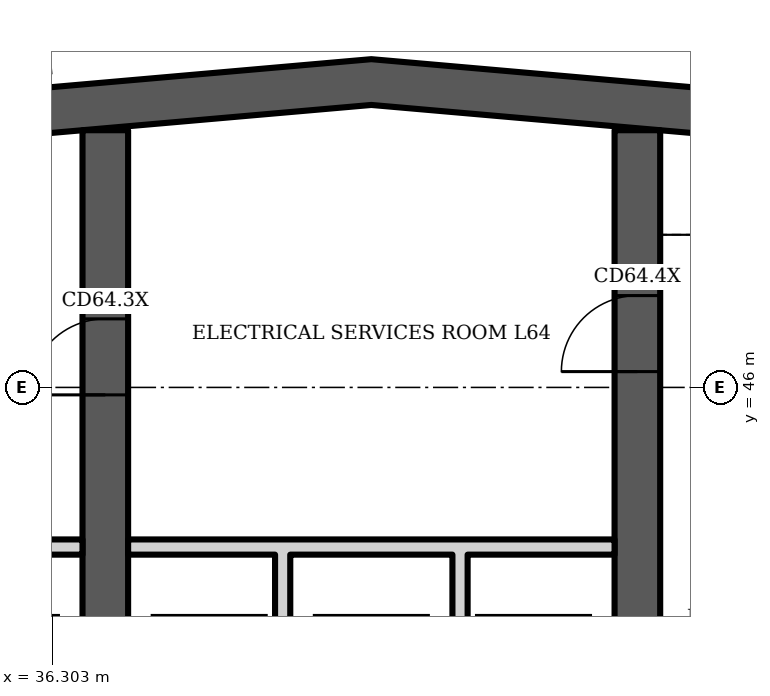
"""IFC4 building model, lengths in metres.
Left out: names, types, materials, properties, quantities, classifications, styles, units other than length and angle.
Written with IfcOpenShell. Run it as: python <this file> out.ifc"""

import sys

from ifc_helpers import new_model, si_unit, direction, frame, frame_2d, origin, place, context, subcontext, project, spatial, polyline, rectangle, outline, extrude, element, fill, save


model = new_model("IFC4")
c1 = context("Model", 3, precision=1e-05, world=origin(), true_north=direction((0.0, 1.0)))
c2 = subcontext(c1, "Body", "Model", "MODEL_VIEW")
j1 = project(units=[si_unit("LENGTHUNIT", "METRE"), si_unit("PLANEANGLEUNIT", "RADIAN")], contexts=[c1])
p1 = place(None, origin())
s1 = spatial("IfcSite", under=j1, at=p1, CompositionType="ELEMENT")
p2 = place(p1, origin())
s2 = spatial("IfcBuilding", under=s1, at=p2, CompositionType="ELEMENT")
p3 = place(p2, frame((0.0, 0.0, 253.9)))
s3 = spatial("IfcBuildingStorey", under=s2, at=p3, CompositionType="ELEMENT", Elevation=253.9)
p4 = place(p3, origin())
e1 = element("IfcWall", 1, at=p4, inside=s3, PredefinedType="SHEAR", context=c2, shape_type="SweptSolid", body=[
    extrude(outline(polyline([(23.0, 48.185), (40.5, 49.716), (58.0, 48.185), (58.0, 48.787), (40.5, 50.318), (23.0, 48.787), (23.0, 48.185)])), origin(), (0.0, 0.0, 1.0), 3.6),
])
p5 = place(p3, frame((37.0, 34.6, 0.0), z_axis=(0.0, 0.0, 1.0), x_axis=(0.0, 1.0, 0.0)))
e2 = element("IfcWall", 2, at=p5, inside=s3, PredefinedType="SHEAR", context=c2, shape_type="SweptSolid", body=[
    extrude(rectangle(XDim=14.784, YDim=0.6, at=frame_2d((7.392, 0.0))), origin(), (0.0, 0.0, 1.0), 3.6),
])
p6 = place(p5, frame((11.302, 0.0, 0.0)))
e3 = element("IfcOpeningElement", 3, at=p6, cuts=e2, PredefinedType="OPENING", context=c2, shape_type="SweptSolid", body=[
    extrude(rectangle(XDim=1.0, YDim=2.1, at=frame_2d((0.5, 1.05))), frame((0.0, 0.31, 0.0), z_axis=(0.0, -1.0, 0.0), x_axis=(1.0, 0.0, 0.0)), (0.0, 0.0, 1.0), 0.62),
])
p7 = place(p5, frame((3.8, 0.0, 0.0)))
e4 = element("IfcOpeningElement", 4, at=p7, cuts=e2, PredefinedType="OPENING", context=c2, shape_type="SweptSolid", body=[
    extrude(rectangle(XDim=1.1, YDim=2.1, at=frame_2d((0.55, 1.05))), frame((0.0, 0.31, 0.0), z_axis=(0.0, -1.0, 0.0), x_axis=(1.0, 0.0, 0.0)), (0.0, 0.0, 1.0), 0.62),
])
p8 = place(p3, frame((44.0, 34.6, 0.0), z_axis=(0.0, 0.0, 1.0), x_axis=(0.0, 1.0, 0.0)))
e5 = element("IfcWall", 5, at=p8, inside=s3, PredefinedType="SHEAR", context=c2, shape_type="SweptSolid", body=[
    extrude(rectangle(XDim=14.784, YDim=0.6, at=frame_2d((7.392, 0.0))), origin(), (0.0, 0.0, 1.0), 3.6),
])
p9 = place(p8, frame((11.608, 0.0, 0.0)))
e6 = element("IfcOpeningElement", 6, at=p9, cuts=e5, PredefinedType="OPENING", context=c2, shape_type="SweptSolid", body=[
    extrude(rectangle(XDim=1.0, YDim=2.1, at=frame_2d((0.5, 1.05))), frame((0.0, 0.31, 0.0), z_axis=(0.0, -1.0, 0.0), x_axis=(1.0, 0.0, 0.0)), (0.0, 0.0, 1.0), 0.62),
])
p10 = place(p8, frame((3.8, 0.0, 0.0)))
e7 = element("IfcOpeningElement", 7, at=p10, cuts=e5, PredefinedType="OPENING", context=c2, shape_type="SweptSolid", body=[
    extrude(rectangle(XDim=1.1, YDim=2.1, at=frame_2d((0.55, 1.05))), frame((0.0, 0.31, 0.0), z_axis=(0.0, -1.0, 0.0), x_axis=(1.0, 0.0, 0.0)), (0.0, 0.0, 1.0), 0.62),
])
p11 = place(p3, origin())
e8 = element("IfcWall", 8, at=p11, inside=s3, PredefinedType="PARTITIONING", context=c2, shape_type="SweptSolid", body=[
    extrude(outline(polyline([(32.433, 40.8), (32.233, 40.8), (32.233, 43.8), (30.3, 43.8), (30.3, 44.0), (36.7, 44.0), (36.7, 43.8), (34.767, 43.8), (34.767, 40.8), (34.567, 40.8), (34.567, 43.8), (32.433, 43.8), (32.433, 40.8)])), origin(), (0.0, 0.0, 1.0), 3.2),
])
p12 = place(p3, origin())
e9 = element("IfcWall", 9, at=p12, inside=s3, PredefinedType="PARTITIONING", context=c2, shape_type="SweptSolid", body=[
    extrude(outline(polyline([(39.433, 40.8), (39.233, 40.8), (39.233, 43.8), (37.3, 43.8), (37.3, 44.0), (43.7, 44.0), (43.7, 43.8), (41.767, 43.8), (41.767, 40.8), (41.567, 40.8), (41.567, 43.8), (39.433, 43.8), (39.433, 40.8)])), origin(), (0.0, 0.0, 1.0), 3.2),
])
p13 = place(p6, origin())
e10 = element("IfcDoor", 10, at=p13, inside=s3, OperationType="SINGLE_SWING_LEFT", PredefinedType="DOOR", context=c2, shape_type="SweptSolid", body=[
    extrude(rectangle(XDim=1.0, YDim=2.1, at=frame_2d((0.5, 1.05))), frame((0.0, 0.025, 0.0), z_axis=(0.0, -1.0, 0.0), x_axis=(1.0, 0.0, 0.0)), (0.0, 0.0, 1.0), 0.05),
])
fill(e3, e10)
p14 = place(p9, origin())
e11 = element("IfcDoor", 11, at=p14, inside=s3, OperationType="SINGLE_SWING_LEFT", PredefinedType="DOOR", context=c2, shape_type="SweptSolid", body=[
    extrude(rectangle(XDim=1.0, YDim=2.1, at=frame_2d((0.5, 1.05))), frame((0.0, 0.025, 0.0), z_axis=(0.0, -1.0, 0.0), x_axis=(1.0, 0.0, 0.0)), (0.0, 0.0, 1.0), 0.05),
])
fill(e6, e11)
save(model, sys.argv[1])
